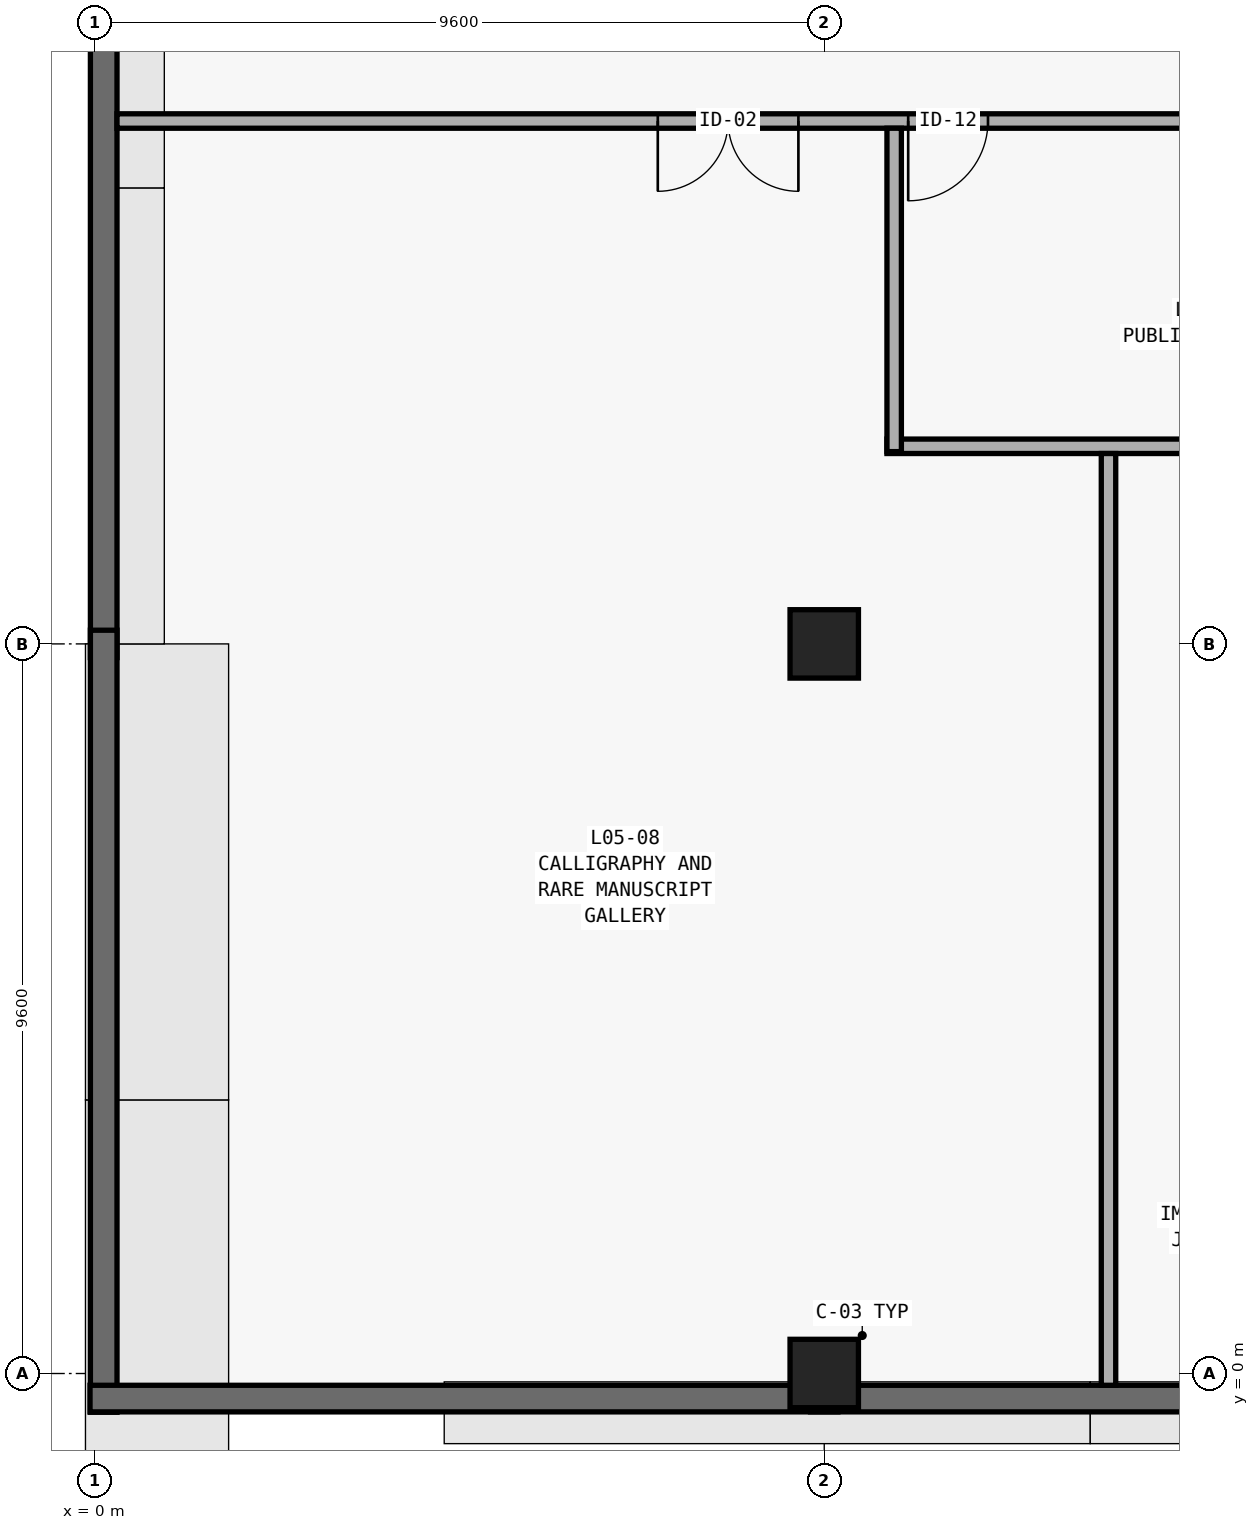
"""IFC4 building model, lengths in metres.
Left out: names, types, materials, properties, quantities, classifications, styles, units other than length and angle.
Written with IfcOpenShell. Run it as: python <this file> out.ifc"""

import sys

from ifc_helpers import new_model, si_unit, direction, frame, frame_2d, origin, origin_2d, place, context, subcontext, project, spatial, rectangle, extrude, element, fill, save


model = new_model("IFC4")
c1 = context("Model", 3, precision=1e-05, world=origin(), true_north=direction((0.0, 1.0)))
c2 = subcontext(c1, "Body", "Model", "MODEL_VIEW")
j1 = project(units=[si_unit("LENGTHUNIT", "METRE"), si_unit("PLANEANGLEUNIT", "RADIAN")], contexts=[c1])
p1 = place(None, origin())
s1 = spatial("IfcSite", under=j1, at=p1, CompositionType="ELEMENT")
p2 = place(p1, origin())
s2 = spatial("IfcBuilding", under=s1, at=p2, CompositionType="ELEMENT")
p3 = place(p2, frame((0.0, 0.0, 25.5)))
s3 = spatial("IfcBuildingStorey", under=s2, at=p3, CompositionType="ELEMENT", Elevation=25.5)
for number, where, z_axis, x_axis in (
    (1, (9.6, 0.0, 0.0), (0.0, 0.0, 1.0), (1.0, 0.0, 0.0)),
    (2, (9.6, 9.6, 0.0), (0.0, 0.0, 1.0), (1.0, 0.0, 0.0)),
):
    element("IfcColumn", number, at=place(p3, frame(where, z_axis=z_axis, x_axis=x_axis)), inside=s3, PredefinedType="COLUMN", context=c2, shape_type="SweptSolid", body=[
        extrude(rectangle(XDim=0.9, YDim=0.9, at=origin_2d()), origin(), (0.0, 0.0, 1.0), 4.2),
    ])
p4 = place(p3, frame((0.12, 21.78, 0.0), z_axis=(0.0, 0.0, 1.0), x_axis=(0.0, -1.0, 0.0)))
e3 = element("IfcWall", 3, at=p4, inside=s3, PredefinedType="STANDARD", context=c2, shape_type="SweptSolid", body=[
    extrude(rectangle(XDim=12.36, YDim=0.35, at=frame_2d((6.18, 0.0))), origin(), (0.0, 0.0, 1.0), 3.9),
])
p5 = place(p3, frame((0.12, 9.78, 0.0), z_axis=(0.0, 0.0, 1.0), x_axis=(0.0, -1.0, 0.0)))
e4 = element("IfcWall", 4, at=p5, inside=s3, PredefinedType="STANDARD", context=c2, shape_type="SweptSolid", body=[
    extrude(rectangle(XDim=10.29, YDim=0.35, at=frame_2d((5.145, 0.0))), origin(), (0.0, 0.0, 1.0), 3.9),
])
p6 = place(p3, frame((-0.06, -0.33, 0.0), z_axis=(0.0, 0.0, 1.0), x_axis=(1.0, 0.0, 0.0)))
e5 = element("IfcWall", 5, at=p6, inside=s3, PredefinedType="STANDARD", context=c2, shape_type="SweptSolid", body=[
    extrude(rectangle(XDim=9.84, YDim=0.35, at=frame_2d((4.92, 0.0))), origin(), (0.0, 0.0, 1.0), 3.9),
])
p7 = place(p3, frame((9.42, -0.33, 0.0), z_axis=(0.0, 0.0, 1.0), x_axis=(1.0, 0.0, 0.0)))
e6 = element("IfcWall", 6, at=p7, inside=s3, PredefinedType="STANDARD", context=c2, shape_type="SweptSolid", body=[
    extrude(rectangle(XDim=5.76, YDim=0.35, at=frame_2d((2.88, 0.0))), origin(), (0.0, 0.0, 1.0), 3.9),
])
p8 = place(p3, frame((10.425, 12.2, 0.0), z_axis=(0.0, 0.0, 1.0), x_axis=(1.0, 0.0, 0.0)))
e7 = element("IfcWall", 7, at=p8, inside=s3, PredefinedType="PARTITIONING", context=c2, shape_type="SweptSolid", body=[
    extrude(rectangle(XDim=5.95, YDim=0.19, at=frame_2d((2.975, 0.0))), origin(), (0.0, 0.0, 1.0), 2.84),
])
p9 = place(p3, frame((0.295, 16.48, 0.0), z_axis=(0.0, 0.0, 1.0), x_axis=(1.0, 0.0, 0.0)))
e8 = element("IfcWall", 8, at=p9, inside=s3, PredefinedType="PARTITIONING", context=c2, shape_type="SweptSolid", body=[
    extrude(rectangle(XDim=16.08, YDim=0.19, at=frame_2d((8.04, 0.0))), origin(), (0.0, 0.0, 1.0), 2.84),
])
p10 = place(p9, frame((10.409, 0.0, 0.0)))
e9 = element("IfcOpeningElement", 9, at=p10, cuts=e8, PredefinedType="OPENING", context=c2, shape_type="SweptSolid", body=[
    extrude(rectangle(XDim=1.05, YDim=2.1, at=frame_2d((0.525, 1.05))), frame((0.0, 0.11, 0.0), z_axis=(0.0, -1.0, 0.0), x_axis=(1.0, 0.0, 0.0)), (0.0, 0.0, 1.0), 0.22),
])
p11 = place(p9, frame((7.115, 0.0, 0.0)))
e10 = element("IfcOpeningElement", 10, at=p11, cuts=e8, PredefinedType="OPENING", context=c2, shape_type="SweptSolid", body=[
    extrude(rectangle(XDim=1.85, YDim=2.35, at=frame_2d((0.925, 1.175))), frame((0.0, 0.11, 0.0), z_axis=(0.0, -1.0, 0.0), x_axis=(1.0, 0.0, 0.0)), (0.0, 0.0, 1.0), 0.22),
])
p12 = place(p3, frame((10.52, 12.13, 0.0), z_axis=(0.0, 0.0, 1.0), x_axis=(0.0, 1.0, 0.0)))
e11 = element("IfcWall", 11, at=p12, inside=s3, PredefinedType="PARTITIONING", context=c2, shape_type="SweptSolid", body=[
    extrude(rectangle(XDim=4.255, YDim=0.19, at=frame_2d((2.127, 0.0))), origin(), (0.0, 0.0, 1.0), 2.84),
])
p13 = place(p3, frame((13.34, -0.155, 0.0), z_axis=(0.0, 0.0, 1.0), x_axis=(0.0, 1.0, 0.0)))
e12 = element("IfcWall", 12, at=p13, inside=s3, PredefinedType="PARTITIONING", context=c2, shape_type="SweptSolid", body=[
    extrude(rectangle(XDim=12.26, YDim=0.19, at=frame_2d((6.13, 0.0))), origin(), (0.0, 0.0, 1.0), 2.84),
])
p14 = place(p10, frame((1.05, 0.0, 0.0), z_axis=(0.0, 0.0, 1.0), x_axis=(-1.0, 0.0, 0.0)))
e13 = element("IfcDoor", 13, at=p14, inside=s3, OperationType="SINGLE_SWING_LEFT", PredefinedType="DOOR", context=c2, shape_type="SweptSolid", body=[
    extrude(rectangle(XDim=1.05, YDim=2.1, at=frame_2d((0.525, 1.05))), frame((0.0, 0.025, 0.0), z_axis=(0.0, -1.0, 0.0), x_axis=(1.0, 0.0, 0.0)), (0.0, 0.0, 1.0), 0.05),
])
fill(e9, e13)
p15 = place(p11, frame((1.85, 0.0, 0.0), z_axis=(0.0, 0.0, 1.0), x_axis=(-1.0, 0.0, 0.0)))
e14 = element("IfcDoor", 14, at=p15, inside=s3, OperationType="DOUBLE_DOOR_SINGLE_SWING", PredefinedType="DOOR", context=c2, shape_type="SweptSolid", body=[
    extrude(rectangle(XDim=1.85, YDim=2.35, at=frame_2d((0.925, 1.175))), frame((0.0, 0.025, 0.0), z_axis=(0.0, -1.0, 0.0), x_axis=(1.0, 0.0, 0.0)), (0.0, 0.0, 1.0), 0.05),
])
fill(e10, e14)
save(model, sys.argv[1])
